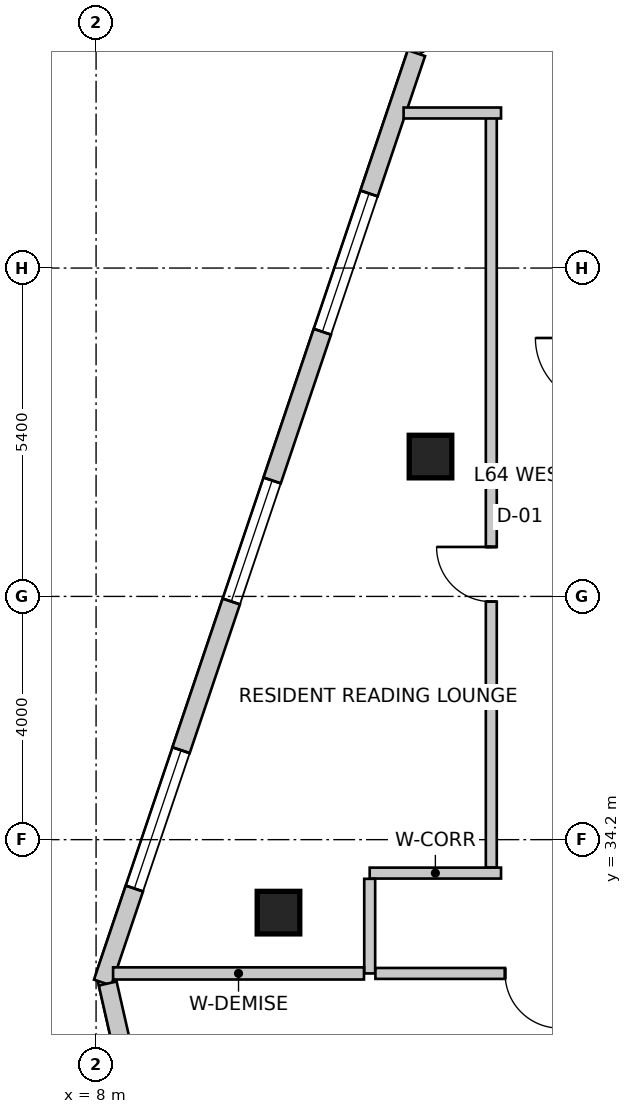
"""IFC4 building model, lengths in metres.
Left out: names, types, materials, properties, quantities, classifications, styles, units other than length and angle.
Written with IfcOpenShell. Run it as: python <this file> out.ifc"""

import sys

from ifc_helpers import new_model, si_unit, direction, frame, frame_2d, origin, origin_2d, place, context, subcontext, project, spatial, rectangle, extrude, source, transform, mapped, element, fill, save


model = new_model("IFC4")
c1 = context("Model", 3, precision=1e-05, world=origin(), true_north=direction((0.0, 1.0)))
c2 = subcontext(c1, "Body", "Model", "MODEL_VIEW")
j1 = project(units=[si_unit("LENGTHUNIT", "METRE"), si_unit("PLANEANGLEUNIT", "RADIAN")], contexts=[c1])
p1 = place(None, origin())
s1 = spatial("IfcSite", under=j1, at=p1, CompositionType="ELEMENT")
p2 = place(p1, origin())
s2 = spatial("IfcBuilding", under=s1, at=p2, CompositionType="ELEMENT")
p3 = place(p2, frame((0.0, 0.0, 252.9)))
s3 = spatial("IfcBuildingStorey", under=s2, at=p3, CompositionType="ELEMENT", Elevation=252.9)
m1 = source(origin(), c2, "Body", "SweptSolid", [
    extrude(rectangle(XDim=0.7, YDim=0.7, at=origin_2d()), origin(), (0.0, 0.0, 1.0), 3.6),
])
for number, where, z_axis, x_axis in (
    (1, (11.0, 33.0, 0.0), (0.0, 0.0, 1.0), (1.0, 0.0, 0.0)),
    (2, (13.5, 40.5, 0.0), (0.0, 0.0, 1.0), (1.0, 0.0, 0.0)),
):
    element("IfcColumn", number, at=place(p3, frame(where, z_axis=z_axis, x_axis=x_axis)), inside=s3, PredefinedType="COLUMN", context=c2, shape_type="MappedRepresentation", body=[
        mapped(m1, transform((0.0, 0.0, 0.0), scale=1.0)),
    ])
p4 = place(p3, frame((21.874, 52.742, 0.0), z_axis=(0.0, 0.0, 1.0), x_axis=(-0.84365659959, -0.536883173482, 0.0)))
e3 = element("IfcWall", 3, at=p4, inside=s3, PredefinedType="SOLIDWALL", context=c2, shape_type="SweptSolid", body=[
    extrude(rectangle(XDim=10.283, YDim=0.3, at=frame_2d((5.142, 0.0))), origin(), (0.0, 0.0, 1.0), 3.35),
])
m2 = source(origin(), c2, "Body", "SweptSolid", [
    extrude(rectangle(XDim=2.1, YDim=2.0, at=frame_2d((1.05, 1.0))), frame((0.0, 0.16, 0.0), z_axis=(0.0, -1.0, 0.0), x_axis=(1.0, 0.0, 0.0)), (0.0, 0.0, 1.0), 0.32),
])
p5 = place(p4, frame((1.41, 0.0, 0.85)))
e4 = element("IfcOpeningElement", 4, at=p5, cuts=e3, PredefinedType="OPENING", context=c2, shape_type="MappedRepresentation", body=[
    mapped(m2, transform((0.0, 0.0, 0.0), scale=1.0)),
])
m3 = source(origin(), c2, "Body", "SweptSolid", [
    extrude(rectangle(XDim=2.4, YDim=2.2, at=frame_2d((1.2, 1.1))), frame((0.0, 0.16, 0.0), z_axis=(0.0, -1.0, 0.0), x_axis=(1.0, 0.0, 0.0)), (0.0, 0.0, 1.0), 0.32),
])
p6 = place(p4, frame((5.54, 0.0, 0.85)))
e5 = element("IfcOpeningElement", 5, at=p6, cuts=e3, PredefinedType="OPENING", context=c2, shape_type="MappedRepresentation", body=[
    mapped(m3, transform((0.0, 0.0, 0.0), scale=1.0)),
])
p7 = place(p3, frame((13.269, 47.134, 0.0), z_axis=(0.0, 0.0, 1.0), x_axis=(-0.3199211297, -0.947444178182, 0.0)))
e6 = element("IfcWall", 6, at=p7, inside=s3, PredefinedType="SOLIDWALL", context=c2, shape_type="SweptSolid", body=[
    extrude(rectangle(XDim=16.132, YDim=0.3, at=frame_2d((8.066, 0.0))), origin(), (0.0, 0.0, 1.0), 3.35),
])
p8 = place(p7, frame((2.435, 0.0, 0.85)))
e7 = element("IfcOpeningElement", 7, at=p8, cuts=e6, PredefinedType="OPENING", context=c2, shape_type="MappedRepresentation", body=[
    mapped(m3, transform((0.0, 0.0, 0.0), scale=1.0)),
])
p9 = place(p7, frame((7.417, 0.0, 0.85)))
e8 = element("IfcOpeningElement", 8, at=p9, cuts=e6, PredefinedType="OPENING", context=c2, shape_type="MappedRepresentation", body=[
    mapped(m2, transform((0.0, 0.0, 0.0), scale=1.0)),
])
p10 = place(p7, frame((12.099, 0.0, 0.85)))
e9 = element("IfcOpeningElement", 9, at=p10, cuts=e6, PredefinedType="OPENING", context=c2, shape_type="MappedRepresentation", body=[
    mapped(m3, transform((0.0, 0.0, 0.0), scale=1.0)),
])
p11 = place(p3, frame((8.191, 31.834, 0.0), z_axis=(0.0, 0.0, 1.0), x_axis=(0.221636032737, -0.975129462683, 0.0)))
e10 = element("IfcWall", 10, at=p11, inside=s3, PredefinedType="SOLIDWALL", context=c2, shape_type="SweptSolid", body=[
    extrude(rectangle(XDim=10.602, YDim=0.3, at=frame_2d((5.301, 0.0))), origin(), (0.0, 0.0, 1.0), 3.35),
])
p12 = place(p11, frame((2.501, 0.0, 0.85)))
e11 = element("IfcOpeningElement", 11, at=p12, cuts=e10, PredefinedType="OPENING", context=c2, shape_type="MappedRepresentation", body=[
    mapped(m2, transform((0.0, 0.0, 0.0), scale=1.0)),
])
p13 = place(p11, frame((7.702, 0.0, 0.85)))
e12 = element("IfcOpeningElement", 12, at=p13, cuts=e10, PredefinedType="OPENING", context=c2, shape_type="MappedRepresentation", body=[
    mapped(m2, transform((0.0, 0.0, 0.0), scale=1.0)),
])
p14 = place(p3, frame((12.5, 33.65, 0.0), z_axis=(0.0, 0.0, 1.0), x_axis=(1.0, 0.0, 0.0)))
e13 = element("IfcWall", 13, at=p14, inside=s3, PredefinedType="PARTITIONING", context=c2, shape_type="SweptSolid", body=[
    extrude(rectangle(XDim=2.16, YDim=0.18, at=frame_2d((1.08, 0.0))), origin(), (0.0, 0.0, 1.0), 3.35),
])
p15 = place(p3, frame((12.5, 32.0, 0.0), z_axis=(0.0, 0.0, 1.0), x_axis=(0.0, 1.0, 0.0)))
e14 = element("IfcWall", 14, at=p15, inside=s3, PredefinedType="PARTITIONING", context=c2, shape_type="SweptSolid", body=[
    extrude(rectangle(XDim=1.556, YDim=0.18, at=frame_2d((0.778, 0.0))), origin(), (0.0, 0.0, 1.0), 3.019),
])
p16 = place(p3, frame((17.635, 32.0, 0.0), z_axis=(0.0, 0.0, 1.0), x_axis=(-1.0, 0.0, 0.0)))
e15 = element("IfcWall", 15, at=p16, inside=s3, PredefinedType="PARTITIONING", context=c2, shape_type="SweptSolid", body=[
    extrude(rectangle(XDim=5.041, YDim=0.18, at=frame_2d((2.521, 0.0))), origin(), (0.0, 0.0, 1.0), 3.019),
])
m4 = source(origin(), c2, "Body", "SweptSolid", [
    extrude(rectangle(XDim=0.9, YDim=2.15, at=frame_2d((0.45, 1.075))), frame((0.0, 0.1, 0.0), z_axis=(0.0, -1.0, 0.0), x_axis=(1.0, 0.0, 0.0)), (0.0, 0.0, 1.0), 0.2),
])
p17 = place(p16, frame((2.009, 0.0, 0.0)))
e16 = element("IfcOpeningElement", 16, at=p17, cuts=e15, PredefinedType="OPENING", context=c2, shape_type="MappedRepresentation", body=[
    mapped(m4, transform((0.0, 0.0, 0.0), scale=1.0)),
])
p18 = place(p3, frame((14.5, 33.744, 0.0), z_axis=(0.0, 0.0, 1.0), x_axis=(0.0, 1.0, 0.0)))
e17 = element("IfcWall", 17, at=p18, inside=s3, PredefinedType="PARTITIONING", context=c2, shape_type="SweptSolid", body=[
    extrude(rectangle(XDim=12.406, YDim=0.18, at=frame_2d((6.203, 0.0))), origin(), (0.0, 0.0, 1.0), 3.35),
])
p19 = place(p18, frame((4.37, 0.0, 0.0)))
e18 = element("IfcOpeningElement", 18, at=p19, cuts=e17, PredefinedType="OPENING", context=c2, shape_type="MappedRepresentation", body=[
    mapped(m4, transform((0.0, 0.0, 0.0), scale=1.0)),
])
p20 = place(p3, frame((14.66, 46.15, 0.0), z_axis=(0.0, 0.0, 1.0), x_axis=(-1.0, 0.0, 0.0)))
e19 = element("IfcWall", 19, at=p20, inside=s3, PredefinedType="PARTITIONING", context=c2, shape_type="SweptSolid", body=[
    extrude(rectangle(XDim=1.602, YDim=0.18, at=frame_2d((0.801, 0.0))), origin(), (0.0, 0.0, 1.0), 3.35),
])
p21 = place(p3, frame((12.406, 32.0, 0.0), z_axis=(0.0, 0.0, 1.0), x_axis=(-1.0, 0.0, 0.0)))
e20 = element("IfcWall", 20, at=p21, inside=s3, PredefinedType="PARTITIONING", context=c2, shape_type="SweptSolid", body=[
    extrude(rectangle(XDim=4.126, YDim=0.2, at=frame_2d((2.063, 0.0))), origin(), (0.0, 0.0, 1.0), 2.642),
])
m5 = source(origin(), c2, "Body", "SweptSolid", [
    extrude(rectangle(XDim=2.4, YDim=2.2, at=frame_2d((1.2, 1.1))), frame((0.0, -0.015, 0.0), z_axis=(0.0, -1.0, 0.0), x_axis=(1.0, 0.0, 0.0)), (0.0, 0.0, 1.0), 0.06),
])
p22 = place(p8, origin())
e21 = element("IfcWindow", 21, at=p22, inside=s3, PartitioningType="SINGLE_PANEL", PredefinedType="WINDOW", context=c2, shape_type="MappedRepresentation", body=[
    mapped(m5, transform((0.0, 0.0, 0.0), scale=1.0)),
])
fill(e7, e21)
m6 = source(origin(), c2, "Body", "SweptSolid", [
    extrude(rectangle(XDim=2.1, YDim=2.0, at=frame_2d((1.05, 1.0))), frame((0.0, -0.015, 0.0), z_axis=(0.0, -1.0, 0.0), x_axis=(1.0, 0.0, 0.0)), (0.0, 0.0, 1.0), 0.06),
])
p23 = place(p9, origin())
e22 = element("IfcWindow", 22, at=p23, inside=s3, PartitioningType="SINGLE_PANEL", PredefinedType="WINDOW", context=c2, shape_type="MappedRepresentation", body=[
    mapped(m6, transform((0.0, 0.0, 0.0), scale=1.0)),
])
fill(e8, e22)
p24 = place(p10, origin())
e23 = element("IfcWindow", 23, at=p24, inside=s3, PartitioningType="SINGLE_PANEL", PredefinedType="WINDOW", context=c2, shape_type="MappedRepresentation", body=[
    mapped(m5, transform((0.0, 0.0, 0.0), scale=1.0)),
])
fill(e9, e23)
m7 = source(origin(), c2, "Body", "SweptSolid", [
    extrude(rectangle(XDim=0.9, YDim=2.15, at=frame_2d((0.45, 1.075))), frame((0.0, 0.025, 0.0), z_axis=(0.0, -1.0, 0.0), x_axis=(1.0, 0.0, 0.0)), (0.0, 0.0, 1.0), 0.05),
])
p25 = place(p19, origin())
e24 = element("IfcDoor", 24, at=p25, inside=s3, OperationType="SINGLE_SWING_RIGHT", PredefinedType="DOOR", context=c2, shape_type="MappedRepresentation", body=[
    mapped(m7, transform((0.0, 0.0, 0.0), scale=1.0)),
])
fill(e18, e24)
m8 = source(origin(), c2, "Body", "SweptSolid", [
    extrude(rectangle(XDim=0.9, YDim=2.15, at=frame_2d((0.45, 1.075))), frame((0.0, 0.025, 0.0), z_axis=(0.0, -1.0, 0.0), x_axis=(1.0, 0.0, 0.0)), (0.0, 0.0, 1.0), 0.05),
])
p26 = place(p17, origin())
e25 = element("IfcDoor", 25, at=p26, inside=s3, OperationType="SINGLE_SWING_LEFT", PredefinedType="DOOR", context=c2, shape_type="MappedRepresentation", body=[
    mapped(m8, transform((0.0, 0.0, 0.0), scale=1.0)),
])
fill(e16, e25)
save(model, sys.argv[1])
